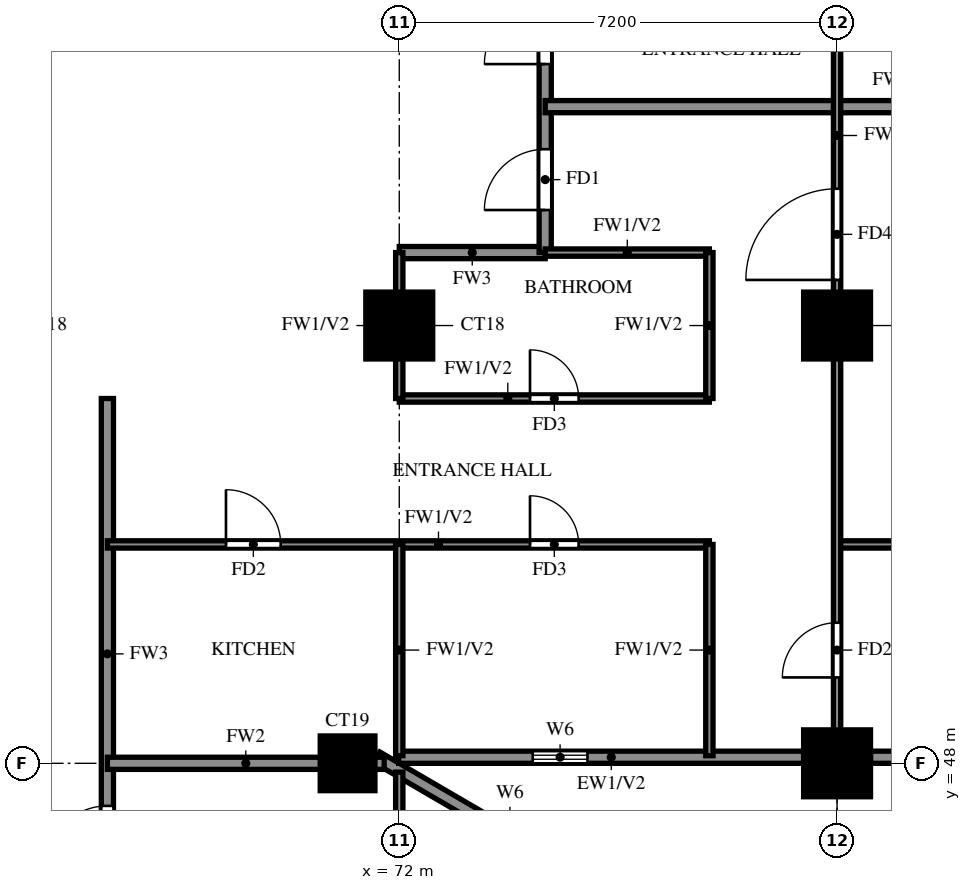
"""IFC4 building model, lengths in metres.
Left out: names, types, materials, properties, quantities, classifications, styles, units other than length and angle.
Written with IfcOpenShell. Run it as: python <this file> out.ifc"""

import sys

from ifc_helpers import new_model, si_unit, direction, frame, frame_2d, origin, origin_2d, place, context, subcontext, project, spatial, rectangle, extrude, source, transform, mapped, element, fill, save


model = new_model("IFC4")
c1 = context("Model", 3, precision=1e-05, world=origin(), true_north=direction((0.0, 1.0)))
c2 = subcontext(c1, "Body", "Model", "MODEL_VIEW")
j1 = project(units=[si_unit("LENGTHUNIT", "METRE"), si_unit("PLANEANGLEUNIT", "RADIAN")], contexts=[c1])
p1 = place(None, origin())
s1 = spatial("IfcSite", under=j1, at=p1, CompositionType="ELEMENT")
p2 = place(p1, origin())
s2 = spatial("IfcBuilding", under=s1, at=p2, CompositionType="ELEMENT")
p3 = place(p2, frame((0.0, 0.0, 113.0)))
s3 = spatial("IfcBuildingStorey", under=s2, at=p3, CompositionType="ELEMENT", Elevation=113.0)
m1 = source(origin(), c2, "Body", "SweptSolid", [
    extrude(rectangle(XDim=0.9, YDim=0.9, at=origin_2d()), origin(), (0.0, 0.0, 1.0), 3.2),
])
p4 = place(p3, frame((71.15, 48.0, 0.0), z_axis=(0.0, 0.0, 1.0), x_axis=(1.0, 0.0, 0.0)))
e1 = element("IfcColumn", 1, at=p4, inside=s3, PredefinedType="COLUMN", context=c2, shape_type="MappedRepresentation", body=[
    mapped(m1, transform((0.0, 0.0, 0.0))),
])
m2 = source(origin(), c2, "Body", "SweptSolid", [
    extrude(rectangle(XDim=1.1, YDim=1.1, at=origin_2d()), origin(), (0.0, 0.0, 1.0), 3.2),
])
for number, where, z_axis, x_axis in (
    (2, (79.2, 48.0, 0.0), (0.0, 0.0, 1.0), (1.0, 0.0, 0.0)),
    (3, (72.0, 55.2, 0.0), (0.0, 0.0, 1.0), (1.0, 0.0, 0.0)),
    (4, (79.2, 55.2, 0.0), (0.0, 0.0, 1.0), (1.0, 0.0, 0.0)),
):
    element("IfcColumn", number, at=place(p3, frame(where, z_axis=z_axis, x_axis=x_axis)), inside=s3, PredefinedType="COLUMN", context=c2, shape_type="MappedRepresentation", body=[
        mapped(m2, transform((0.0, 0.0, 0.0))),
    ])
p5 = place(p3, frame((85.719, 39.881, 0.0), z_axis=(0.0, 0.0, 1.0), x_axis=(-0.86377618652, 0.503875678716, 0.0)))
e5 = element("IfcWall", 5, at=p5, inside=s3, PredefinedType="SOLIDWALL", context=c2, shape_type="SweptSolid", body=[
    extrude(rectangle(XDim=16.311, YDim=0.2, at=frame_2d((8.156, 0.0))), origin(), (0.0, 0.0, 1.0), 3.2),
])
p6 = place(p5, frame((13.326, 0.0, 1.5)))
e6 = element("IfcOpeningElement", 6, at=p6, cuts=e5, PredefinedType="OPENING", context=c2, shape_type="SweptSolid", body=[
    extrude(rectangle(XDim=0.9, YDim=0.9, at=frame_2d((0.45, 0.45))), frame((0.0, 0.11, 0.0), z_axis=(0.0, -1.0, 0.0), x_axis=(1.0, 0.0, 0.0)), (0.0, 0.0, 1.0), 0.22),
])
p7 = place(p3, frame((71.99, 48.1, 0.0), z_axis=(0.0, 0.0, 1.0), x_axis=(1.0, 0.0, 0.0)))
e7 = element("IfcWall", 7, at=p7, inside=s3, PredefinedType="SOLIDWALL", context=c2, shape_type="SweptSolid", body=[
    extrude(rectangle(XDim=6.66, YDim=0.2, at=frame_2d((3.33, 0.0))), origin(), (0.0, 0.0, 1.0), 3.2),
])
p8 = place(p7, frame((2.205, 0.0, 1.5)))
e8 = element("IfcOpeningElement", 8, at=p8, cuts=e7, PredefinedType="OPENING", context=c2, shape_type="SweptSolid", body=[
    extrude(rectangle(XDim=0.9, YDim=0.9, at=frame_2d((0.45, 0.45))), frame((0.0, 0.11, 0.0), z_axis=(0.0, -1.0, 0.0), x_axis=(1.0, 0.0, 0.0)), (0.0, 0.0, 1.0), 0.22),
])
p9 = place(p3, frame((79.75, 48.1, 0.0), z_axis=(0.0, 0.0, 1.0), x_axis=(1.0, 0.0, 0.0)))
e9 = element("IfcWall", 9, at=p9, inside=s3, PredefinedType="SOLIDWALL", context=c2, shape_type="SweptSolid", body=[
    extrude(rectangle(XDim=5.6, YDim=0.2, at=frame_2d((2.8, 0.0))), origin(), (0.0, 0.0, 1.0), 3.2),
])
p10 = place(p9, frame((1.6, 0.0, 0.6)))
e10 = element("IfcOpeningElement", 10, at=p10, cuts=e9, PredefinedType="OPENING", context=c2, shape_type="SweptSolid", body=[
    extrude(rectangle(XDim=2.4, YDim=2.4, at=frame_2d((1.2, 1.2))), frame((0.0, 0.11, 0.0), z_axis=(0.0, -1.0, 0.0), x_axis=(1.0, 0.0, 0.0)), (0.0, 0.0, 1.0), 0.22),
])
p11 = place(p3, frame((72.0, 56.4, 0.0), z_axis=(0.0, 0.0, 1.0), x_axis=(1.0, 0.0, 0.0)))
e11 = element("IfcWall", 11, at=p11, inside=s3, PredefinedType="SOLIDWALL", context=c2, shape_type="SweptSolid", body=[
    extrude(rectangle(XDim=2.4, YDim=0.2, at=frame_2d((1.2, 0.0))), origin(), (0.0, 0.0, 1.0), 3.2),
])
p12 = place(p3, frame((67.2, 45.6, 0.0), z_axis=(0.0, 0.0, 1.0), x_axis=(0.0, 1.0, 0.0)))
e12 = element("IfcWall", 12, at=p12, inside=s3, PredefinedType="SOLIDWALL", context=c2, shape_type="SweptSolid", body=[
    extrude(rectangle(XDim=8.4, YDim=0.2, at=frame_2d((4.2, 0.0))), origin(), (0.0, 0.0, 1.0), 3.2),
])
p13 = place(p12, frame((0.7, 0.0, 0.0)))
e13 = element("IfcOpeningElement", 13, at=p13, cuts=e12, PredefinedType="OPENING", context=c2, shape_type="SweptSolid", body=[
    extrude(rectangle(XDim=1.0, YDim=2.1, at=frame_2d((0.5, 1.05))), frame((0.0, 0.11, 0.0), z_axis=(0.0, -1.0, 0.0), x_axis=(1.0, 0.0, 0.0)), (0.0, 0.0, 1.0), 0.22),
])
p14 = place(p3, frame((74.4, 56.4, 0.0), z_axis=(0.0, 0.0, 1.0), x_axis=(0.0, 1.0, 0.0)))
e14 = element("IfcWall", 14, at=p14, inside=s3, PredefinedType="SOLIDWALL", context=c2, shape_type="SweptSolid", body=[
    extrude(rectangle(XDim=9.6, YDim=0.2, at=frame_2d((4.8, 0.0))), origin(), (0.0, 0.0, 1.0), 3.2),
])
p15 = place(p14, frame((0.7, 0.0, 0.0)))
e15 = element("IfcOpeningElement", 15, at=p15, cuts=e14, PredefinedType="OPENING", context=c2, shape_type="SweptSolid", body=[
    extrude(rectangle(XDim=1.0, YDim=2.1, at=frame_2d((0.5, 1.05))), frame((0.0, 0.11, 0.0), z_axis=(0.0, -1.0, 0.0), x_axis=(1.0, 0.0, 0.0)), (0.0, 0.0, 1.0), 0.22),
])
p16 = place(p14, frame((3.1, 0.0, 0.0)))
e16 = element("IfcOpeningElement", 16, at=p16, cuts=e14, PredefinedType="OPENING", context=c2, shape_type="SweptSolid", body=[
    extrude(rectangle(XDim=1.0, YDim=2.1, at=frame_2d((0.5, 1.05))), frame((0.0, 0.11, 0.0), z_axis=(0.0, -1.0, 0.0), x_axis=(1.0, 0.0, 0.0)), (0.0, 0.0, 1.0), 0.22),
])
p17 = place(p3, frame((67.2, 48.0, 0.0), z_axis=(0.0, 0.0, 1.0), x_axis=(1.0, 0.0, 0.0)))
e17 = element("IfcWall", 17, at=p17, inside=s3, PredefinedType="SOLIDWALL", context=c2, shape_type="SweptSolid", body=[
    extrude(rectangle(XDim=4.552, YDim=0.2, at=frame_2d((2.276, 0.0))), origin(), (0.0, 0.0, 1.0), 3.2),
])
p18 = place(p3, frame((74.4, 58.8, 0.0), z_axis=(0.0, 0.0, 1.0), x_axis=(1.0, 0.0, 0.0)))
e18 = element("IfcWall", 18, at=p18, inside=s3, PredefinedType="SOLIDWALL", context=c2, shape_type="SweptSolid", body=[
    extrude(rectangle(XDim=11.875, YDim=0.2, at=frame_2d((5.938, 0.0))), origin(), (0.0, 0.0, 1.0), 2.3),
])
p19 = place(p3, frame((67.2, 51.6, 0.0), z_axis=(0.0, 0.0, 1.0), x_axis=(1.0, 0.0, 0.0)))
e19 = element("IfcWall", 19, at=p19, inside=s3, PredefinedType="PARTITIONING", context=c2, shape_type="SweptSolid", body=[
    extrude(rectangle(XDim=9.9, YDim=0.12, at=frame_2d((4.95, 0.0))), origin(), (0.0, 0.0, 1.0), 3.2),
])
p20 = place(p19, frame((6.95, 0.0, 0.0)))
e20 = element("IfcOpeningElement", 20, at=p20, cuts=e19, PredefinedType="OPENING", context=c2, shape_type="SweptSolid", body=[
    extrude(rectangle(XDim=0.8, YDim=2.1, at=frame_2d((0.4, 1.05))), frame((0.0, 0.07, 0.0), z_axis=(0.0, -1.0, 0.0), x_axis=(1.0, 0.0, 0.0)), (0.0, 0.0, 1.0), 0.14),
])
p21 = place(p19, frame((1.95, 0.0, 0.0)))
e21 = element("IfcOpeningElement", 21, at=p21, cuts=e19, PredefinedType="OPENING", context=c2, shape_type="SweptSolid", body=[
    extrude(rectangle(XDim=0.9, YDim=2.1, at=frame_2d((0.45, 1.05))), frame((0.0, 0.07, 0.0), z_axis=(0.0, -1.0, 0.0), x_axis=(1.0, 0.0, 0.0)), (0.0, 0.0, 1.0), 0.14),
])
p22 = place(p3, frame((79.2, 51.6, 0.0), z_axis=(0.0, 0.0, 1.0), x_axis=(1.0, 0.0, 0.0)))
e22 = element("IfcWall", 22, at=p22, inside=s3, PredefinedType="PARTITIONING", context=c2, shape_type="SweptSolid", body=[
    extrude(rectangle(XDim=7.075, YDim=0.12, at=frame_2d((3.538, 0.0))), origin(), (0.0, 0.0, 1.0), 2.3),
])
p23 = place(p3, frame((72.0, 54.0, 0.0), z_axis=(0.0, 0.0, 1.0), x_axis=(1.0, 0.0, 0.0)))
e23 = element("IfcWall", 23, at=p23, inside=s3, PredefinedType="PARTITIONING", context=c2, shape_type="SweptSolid", body=[
    extrude(rectangle(XDim=5.1, YDim=0.12, at=frame_2d((2.55, 0.0))), origin(), (0.0, 0.0, 1.0), 3.2),
])
p24 = place(p23, frame((2.15, 0.0, 0.0)))
e24 = element("IfcOpeningElement", 24, at=p24, cuts=e23, PredefinedType="OPENING", context=c2, shape_type="SweptSolid", body=[
    extrude(rectangle(XDim=0.8, YDim=2.1, at=frame_2d((0.4, 1.05))), frame((0.0, 0.07, 0.0), z_axis=(0.0, -1.0, 0.0), x_axis=(1.0, 0.0, 0.0)), (0.0, 0.0, 1.0), 0.14),
])
p25 = place(p3, frame((74.4, 56.4, 0.0), z_axis=(0.0, 0.0, 1.0), x_axis=(1.0, 0.0, 0.0)))
e25 = element("IfcWall", 25, at=p25, inside=s3, PredefinedType="PARTITIONING", context=c2, shape_type="SweptSolid", body=[
    extrude(rectangle(XDim=2.7, YDim=0.12, at=frame_2d((1.35, 0.0))), origin(), (0.0, 0.0, 1.0), 3.2),
])
p26 = place(p3, frame((72.0, 39.725, 0.0), z_axis=(0.0, 0.0, 1.0), x_axis=(0.0, 1.0, 0.0)))
e26 = element("IfcWall", 26, at=p26, inside=s3, PredefinedType="PARTITIONING", context=c2, shape_type="SweptSolid", body=[
    extrude(rectangle(XDim=8.13, YDim=0.12, at=frame_2d((4.065, 0.0))), origin(), (0.0, 0.0, 1.0), 2.3),
])
p27 = place(p26, frame((1.788, 0.0, 0.0)))
e27 = element("IfcOpeningElement", 27, at=p27, cuts=e26, PredefinedType="OPENING", context=c2, shape_type="SweptSolid", body=[
    extrude(rectangle(XDim=0.9, YDim=2.1, at=frame_2d((0.45, 1.05))), frame((0.0, 0.07, 0.0), z_axis=(0.0, -1.0, 0.0), x_axis=(1.0, 0.0, 0.0)), (0.0, 0.0, 1.0), 0.14),
])
p28 = place(p26, frame((4.575, 0.0, 0.0)))
e28 = element("IfcOpeningElement", 28, at=p28, cuts=e26, PredefinedType="OPENING", context=c2, shape_type="SweptSolid", body=[
    extrude(rectangle(XDim=0.8, YDim=2.1, at=frame_2d((0.4, 1.05))), frame((0.0, 0.07, 0.0), z_axis=(0.0, -1.0, 0.0), x_axis=(1.0, 0.0, 0.0)), (0.0, 0.0, 1.0), 0.14),
])
p29 = place(p3, frame((72.0, 48.125, 0.0), z_axis=(0.0, 0.0, 1.0), x_axis=(0.0, 1.0, 0.0)))
e29 = element("IfcWall", 29, at=p29, inside=s3, PredefinedType="PARTITIONING", context=c2, shape_type="SweptSolid", body=[
    extrude(rectangle(XDim=3.475, YDim=0.12, at=frame_2d((1.738, 0.0))), origin(), (0.0, 0.0, 1.0), 3.2),
])
p30 = place(p3, frame((72.0, 54.0, 0.0), z_axis=(0.0, 0.0, 1.0), x_axis=(0.0, 1.0, 0.0)))
e30 = element("IfcWall", 30, at=p30, inside=s3, PredefinedType="PARTITIONING", context=c2, shape_type="SweptSolid", body=[
    extrude(rectangle(XDim=2.4, YDim=0.12, at=frame_2d((1.2, 0.0))), origin(), (0.0, 0.0, 1.0), 3.2),
])
p31 = place(p3, frame((77.1, 48.125, 0.0), z_axis=(0.0, 0.0, 1.0), x_axis=(0.0, 1.0, 0.0)))
e31 = element("IfcWall", 31, at=p31, inside=s3, PredefinedType="PARTITIONING", context=c2, shape_type="SweptSolid", body=[
    extrude(rectangle(XDim=3.475, YDim=0.12, at=frame_2d((1.738, 0.0))), origin(), (0.0, 0.0, 1.0), 3.2),
])
p32 = place(p3, frame((77.1, 54.0, 0.0), z_axis=(0.0, 0.0, 1.0), x_axis=(0.0, 1.0, 0.0)))
e32 = element("IfcWall", 32, at=p32, inside=s3, PredefinedType="PARTITIONING", context=c2, shape_type="SweptSolid", body=[
    extrude(rectangle(XDim=2.4, YDim=0.12, at=frame_2d((1.2, 0.0))), origin(), (0.0, 0.0, 1.0), 3.2),
])
p33 = place(p3, frame((79.2, 48.125, 0.0), z_axis=(0.0, 0.0, 1.0), x_axis=(0.0, 1.0, 0.0)))
e33 = element("IfcWall", 33, at=p33, inside=s3, PredefinedType="PARTITIONING", context=c2, shape_type="SweptSolid", body=[
    extrude(rectangle(XDim=21.475, YDim=0.12, at=frame_2d((10.738, 0.0))), origin(), (0.0, 0.0, 1.0), 3.2),
])
p34 = place(p33, frame((1.288, 0.0, 0.0)))
e34 = element("IfcOpeningElement", 34, at=p34, cuts=e33, PredefinedType="OPENING", context=c2, shape_type="SweptSolid", body=[
    extrude(rectangle(XDim=0.9, YDim=2.1, at=frame_2d((0.45, 1.05))), frame((0.0, 0.07, 0.0), z_axis=(0.0, -1.0, 0.0), x_axis=(1.0, 0.0, 0.0)), (0.0, 0.0, 1.0), 0.14),
])
p35 = place(p33, frame((7.825, 0.0, 0.0)))
e35 = element("IfcOpeningElement", 35, at=p35, cuts=e33, PredefinedType="OPENING", context=c2, shape_type="SweptSolid", body=[
    extrude(rectangle(XDim=1.5, YDim=2.1, at=frame_2d((0.75, 1.05))), frame((0.0, 0.07, 0.0), z_axis=(0.0, -1.0, 0.0), x_axis=(1.0, 0.0, 0.0)), (0.0, 0.0, 1.0), 0.14),
])
p36 = place(p33, frame((12.025, 0.0, 0.0)))
e36 = element("IfcOpeningElement", 36, at=p36, cuts=e33, PredefinedType="OPENING", context=c2, shape_type="SweptSolid", body=[
    extrude(rectangle(XDim=0.9, YDim=2.1, at=frame_2d((0.45, 1.05))), frame((0.0, 0.07, 0.0), z_axis=(0.0, -1.0, 0.0), x_axis=(1.0, 0.0, 0.0)), (0.0, 0.0, 1.0), 0.14),
])
p37 = place(p33, frame((17.425, 0.0, 0.0)))
e37 = element("IfcOpeningElement", 37, at=p37, cuts=e33, PredefinedType="OPENING", context=c2, shape_type="SweptSolid", body=[
    extrude(rectangle(XDim=0.9, YDim=2.1, at=frame_2d((0.45, 1.05))), frame((0.0, 0.07, 0.0), z_axis=(0.0, -1.0, 0.0), x_axis=(1.0, 0.0, 0.0)), (0.0, 0.0, 1.0), 0.14),
])
p38 = place(p8, origin())
e38 = element("IfcWindow", 38, at=p38, inside=s3, PartitioningType="SINGLE_PANEL", PredefinedType="WINDOW", context=c2, shape_type="SweptSolid", body=[
    extrude(rectangle(XDim=0.9, YDim=0.9, at=frame_2d((0.45, 0.45))), frame((0.0, 0.03, 0.0), z_axis=(0.0, -1.0, 0.0), x_axis=(1.0, 0.0, 0.0)), (0.0, 0.0, 1.0), 0.06),
])
fill(e8, e38)
p39 = place(p15, origin())
e39 = element("IfcDoor", 39, at=p39, inside=s3, OperationType="SINGLE_SWING_LEFT", PredefinedType="DOOR", context=c2, shape_type="SweptSolid", body=[
    extrude(rectangle(XDim=1.0, YDim=2.1, at=frame_2d((0.5, 1.05))), frame((0.0, 0.025, 0.0), z_axis=(0.0, -1.0, 0.0), x_axis=(1.0, 0.0, 0.0)), (0.0, 0.0, 1.0), 0.05),
])
fill(e15, e39)
p40 = place(p34, origin())
e40 = element("IfcDoor", 40, at=p40, inside=s3, OperationType="SINGLE_SWING_RIGHT", PredefinedType="DOOR", context=c2, shape_type="SweptSolid", body=[
    extrude(rectangle(XDim=0.9, YDim=2.1, at=frame_2d((0.45, 1.05))), frame((0.0, 0.025, 0.0), z_axis=(0.0, -1.0, 0.0), x_axis=(1.0, 0.0, 0.0)), (0.0, 0.0, 1.0), 0.05),
])
fill(e34, e40)
p41 = place(p35, origin())
e41 = element("IfcDoor", 41, at=p41, inside=s3, OperationType="SINGLE_SWING_RIGHT", PredefinedType="DOOR", context=c2, shape_type="SweptSolid", body=[
    extrude(rectangle(XDim=1.5, YDim=2.1, at=frame_2d((0.75, 1.05))), frame((0.0, 0.025, 0.0), z_axis=(0.0, -1.0, 0.0), x_axis=(1.0, 0.0, 0.0)), (0.0, 0.0, 1.0), 0.05),
])
fill(e35, e41)
p42 = place(p20, origin())
e42 = element("IfcDoor", 42, at=p42, inside=s3, OperationType="SINGLE_SWING_LEFT", PredefinedType="DOOR", context=c2, shape_type="SweptSolid", body=[
    extrude(rectangle(XDim=0.8, YDim=2.1, at=frame_2d((0.4, 1.05))), frame((0.0, 0.025, 0.0), z_axis=(0.0, -1.0, 0.0), x_axis=(1.0, 0.0, 0.0)), (0.0, 0.0, 1.0), 0.05),
])
fill(e20, e42)
p43 = place(p24, origin())
e43 = element("IfcDoor", 43, at=p43, inside=s3, OperationType="SINGLE_SWING_RIGHT", PredefinedType="DOOR", context=c2, shape_type="SweptSolid", body=[
    extrude(rectangle(XDim=0.8, YDim=2.1, at=frame_2d((0.4, 1.05))), frame((0.0, 0.025, 0.0), z_axis=(0.0, -1.0, 0.0), x_axis=(1.0, 0.0, 0.0)), (0.0, 0.0, 1.0), 0.05),
])
fill(e24, e43)
p44 = place(p21, origin())
e44 = element("IfcDoor", 44, at=p44, inside=s3, OperationType="SINGLE_SWING_LEFT", PredefinedType="DOOR", context=c2, shape_type="SweptSolid", body=[
    extrude(rectangle(XDim=0.9, YDim=2.1, at=frame_2d((0.45, 1.05))), frame((0.0, 0.025, 0.0), z_axis=(0.0, -1.0, 0.0), x_axis=(1.0, 0.0, 0.0)), (0.0, 0.0, 1.0), 0.05),
])
fill(e21, e44)
p45 = place(p16, origin())
e45 = element("IfcDoor", 45, at=p45, inside=s3, OperationType="SINGLE_SWING_RIGHT", PredefinedType="DOOR", context=c2, shape_type="SweptSolid", body=[
    extrude(rectangle(XDim=1.0, YDim=2.1, at=frame_2d((0.5, 1.05))), frame((0.0, 0.025, 0.0), z_axis=(0.0, -1.0, 0.0), x_axis=(1.0, 0.0, 0.0)), (0.0, 0.0, 1.0), 0.05),
])
fill(e16, e45)
p46 = place(p13, origin())
e46 = element("IfcDoor", 46, at=p46, inside=s3, OperationType="SINGLE_SWING_LEFT", PredefinedType="DOOR", context=c2, shape_type="SweptSolid", body=[
    extrude(rectangle(XDim=1.0, YDim=2.1, at=frame_2d((0.5, 1.05))), frame((0.0, 0.025, 0.0), z_axis=(0.0, -1.0, 0.0), x_axis=(1.0, 0.0, 0.0)), (0.0, 0.0, 1.0), 0.05),
])
fill(e13, e46)
save(model, sys.argv[1])
